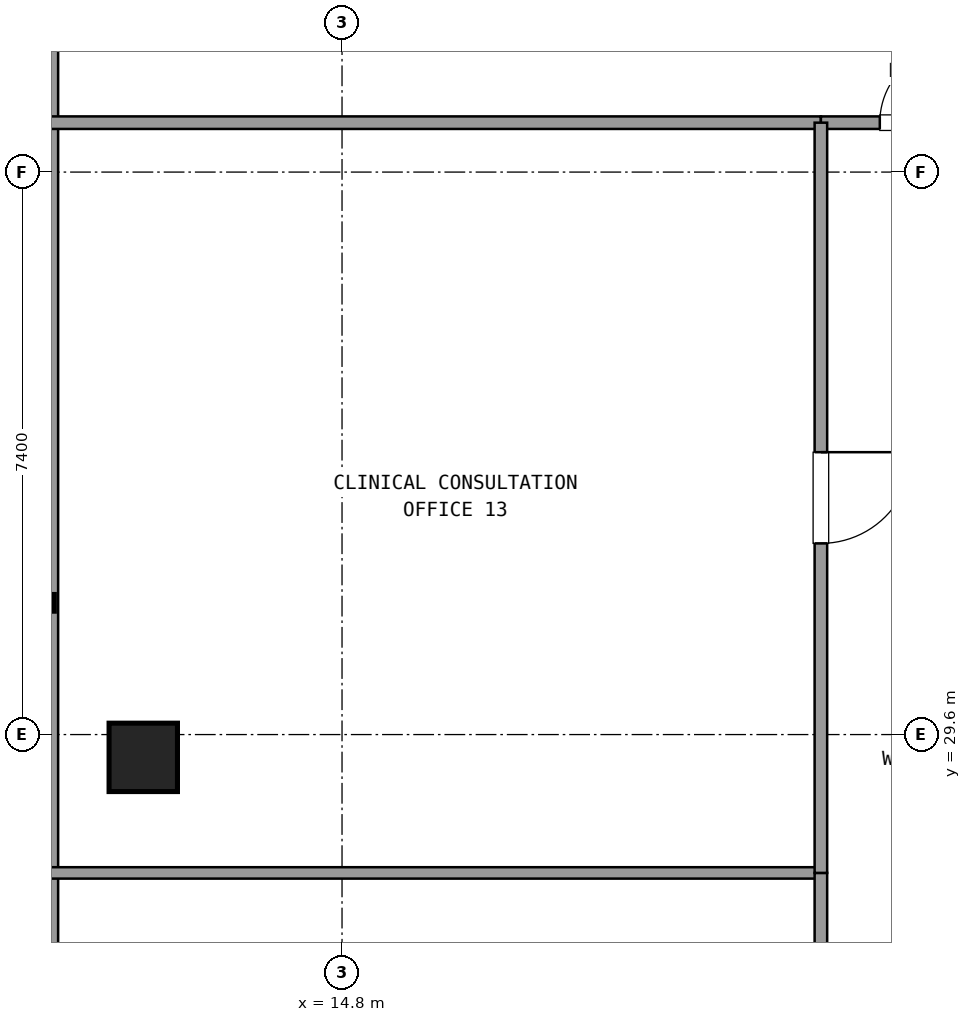
"""IFC4 building model, lengths in metres.
Left out: names, types, materials, properties, quantities, classifications, styles, units other than length and angle.
Written with IfcOpenShell. Run it as: python <this file> out.ifc"""

import sys

from ifc_helpers import new_model, si_unit, direction, frame, frame_2d, origin, origin_2d, place, context, subcontext, project, spatial, rectangle, extrude, element, fill, save


model = new_model("IFC4")
c1 = context("Model", 3, precision=1e-05, world=origin(), true_north=direction((0.0, 1.0)))
c2 = subcontext(c1, "Body", "Model", "MODEL_VIEW")
j1 = project(units=[si_unit("LENGTHUNIT", "METRE"), si_unit("PLANEANGLEUNIT", "RADIAN")], contexts=[c1])
p1 = place(None, origin())
s1 = spatial("IfcSite", under=j1, at=p1, CompositionType="ELEMENT")
p2 = place(p1, origin())
s2 = spatial("IfcBuilding", under=s1, at=p2, CompositionType="ELEMENT")
p3 = place(p2, frame((0.0, 0.0, 210.78)))
s3 = spatial("IfcBuildingStorey", under=s2, at=p3, CompositionType="ELEMENT", Elevation=210.78)
p4 = place(p3, frame((12.185, 29.3, 0.021), z_axis=(-0.084578849141, 0.0, 0.99641678944), x_axis=(0.0, -1.0, 0.0)))
e1 = element("IfcColumn", 1, at=p4, inside=s3, PredefinedType="COLUMN", context=c2, shape_type="SweptSolid", body=[
    extrude(rectangle(XDim=0.9, YDim=0.9, at=origin_2d()), origin(), (0.0, 0.0, 1.0), 3.571),
])
p5 = place(p3, frame((10.945, 42.198, 0.0), z_axis=(0.0, 0.0, 1.0), x_axis=(0.0, -1.0, 0.0)))
e2 = element("IfcWall", 2, at=p5, inside=s3, PredefinedType="SOLIDWALL", context=c2, shape_type="SweptSolid", body=[
    extrude(rectangle(XDim=32.596, YDim=0.24, at=frame_2d((16.298, 0.0))), origin(), (0.0, 0.0, 1.0), 0.85),
])
p6 = place(p3, frame((10.965, 37.65, 0.0), z_axis=(0.0, 0.0, 1.0), x_axis=(1.0, 0.0, 0.0)))
e3 = element("IfcWall", 3, at=p6, inside=s3, PredefinedType="PARTITIONING", context=c2, shape_type="SweptSolid", body=[
    extrude(rectangle(XDim=10.135, YDim=0.165, at=frame_2d((5.067, 0.0))), origin(), (0.0, 0.0, 1.0), 2.61),
])
p7 = place(p3, frame((21.1, 37.65, 0.0), z_axis=(0.0, 0.0, 1.0), x_axis=(1.0, 0.0, 0.0)))
e4 = element("IfcWall", 4, at=p7, inside=s3, PredefinedType="PARTITIONING", context=c2, shape_type="SweptSolid", body=[
    extrude(rectangle(XDim=2.55, YDim=0.165, at=frame_2d((1.275, 0.0))), origin(), (0.0, 0.0, 1.0), 2.61),
])
p8 = place(p7, frame((0.775, 0.0, 0.0)))
e5 = element("IfcOpeningElement", 5, at=p8, cuts=e4, PredefinedType="OPENING", context=c2, shape_type="SweptSolid", body=[
    extrude(rectangle(XDim=1.0, YDim=2.15, at=frame_2d((0.5, 1.075))), frame((0.0, 0.093, 0.0), z_axis=(0.0, -1.0, 0.0), x_axis=(1.0, 0.0, 0.0)), (0.0, 0.0, 1.0), 0.185),
])
p9 = place(p3, frame((21.1, 27.78, 0.0), z_axis=(0.0, 0.0, 1.0), x_axis=(-1.0, 0.0, 0.0)))
e6 = element("IfcWall", 6, at=p9, inside=s3, PredefinedType="PARTITIONING", context=c2, shape_type="SweptSolid", body=[
    extrude(rectangle(XDim=10.135, YDim=0.15, at=frame_2d((5.067, 0.0))), origin(), (0.0, 0.0, 1.0), 2.61),
])
p10 = place(p3, frame((21.1, 19.79, 0.0), z_axis=(0.0, 0.0, 1.0), x_axis=(0.0, 1.0, 0.0)))
e7 = element("IfcWall", 7, at=p10, inside=s3, PredefinedType="PARTITIONING", context=c2, shape_type="SweptSolid", body=[
    extrude(rectangle(XDim=7.99, YDim=0.165, at=frame_2d((3.995, 0.0))), origin(), (0.0, 0.0, 1.0), 2.61),
])
p11 = place(p10, frame((3.395, 0.0, 0.0)))
e8 = element("IfcOpeningElement", 8, at=p11, cuts=e7, PredefinedType="OPENING", context=c2, shape_type="SweptSolid", body=[
    extrude(rectangle(XDim=1.2, YDim=2.15, at=frame_2d((0.6, 1.075))), frame((0.0, 0.093, 0.0), z_axis=(0.0, -1.0, 0.0), x_axis=(1.0, 0.0, 0.0)), (0.0, 0.0, 1.0), 0.185),
])
p12 = place(p3, frame((21.1, 27.78, 0.0), z_axis=(0.0, 0.0, 1.0), x_axis=(0.0, 1.0, 0.0)))
e9 = element("IfcWall", 9, at=p12, inside=s3, PredefinedType="PARTITIONING", context=c2, shape_type="SweptSolid", body=[
    extrude(rectangle(XDim=9.87, YDim=0.165, at=frame_2d((4.935, 0.0))), origin(), (0.0, 0.0, 1.0), 2.61),
])
p13 = place(p12, frame((4.335, 0.0, 0.0)))
e10 = element("IfcOpeningElement", 10, at=p13, cuts=e9, PredefinedType="OPENING", context=c2, shape_type="SweptSolid", body=[
    extrude(rectangle(XDim=1.2, YDim=2.15, at=frame_2d((0.6, 1.075))), frame((0.0, 0.093, 0.0), z_axis=(0.0, -1.0, 0.0), x_axis=(1.0, 0.0, 0.0)), (0.0, 0.0, 1.0), 0.185),
])
p14 = place(p8, origin())
e11 = element("IfcDoor", 11, at=p14, inside=s3, OperationType="SINGLE_SWING_RIGHT", PredefinedType="DOOR", context=c2, shape_type="SweptSolid", body=[
    extrude(rectangle(XDim=1.0, YDim=2.15, at=frame_2d((0.5, 1.075))), frame((0.0, 0.025, 0.0), z_axis=(0.0, -1.0, 0.0), x_axis=(1.0, 0.0, 0.0)), (0.0, 0.0, 1.0), 0.05),
])
fill(e5, e11)
p15 = place(p13, frame((1.2, 0.0, 0.0), z_axis=(0.0, 0.0, 1.0), x_axis=(-1.0, 0.0, 0.0)))
e12 = element("IfcDoor", 12, at=p15, inside=s3, OperationType="SINGLE_SWING_RIGHT", PredefinedType="DOOR", context=c2, shape_type="SweptSolid", body=[
    extrude(rectangle(XDim=1.2, YDim=2.15, at=frame_2d((0.6, 1.075))), frame((0.0, 0.025, 0.0), z_axis=(0.0, -1.0, 0.0), x_axis=(1.0, 0.0, 0.0)), (0.0, 0.0, 1.0), 0.05),
])
fill(e10, e12)
save(model, sys.argv[1])
